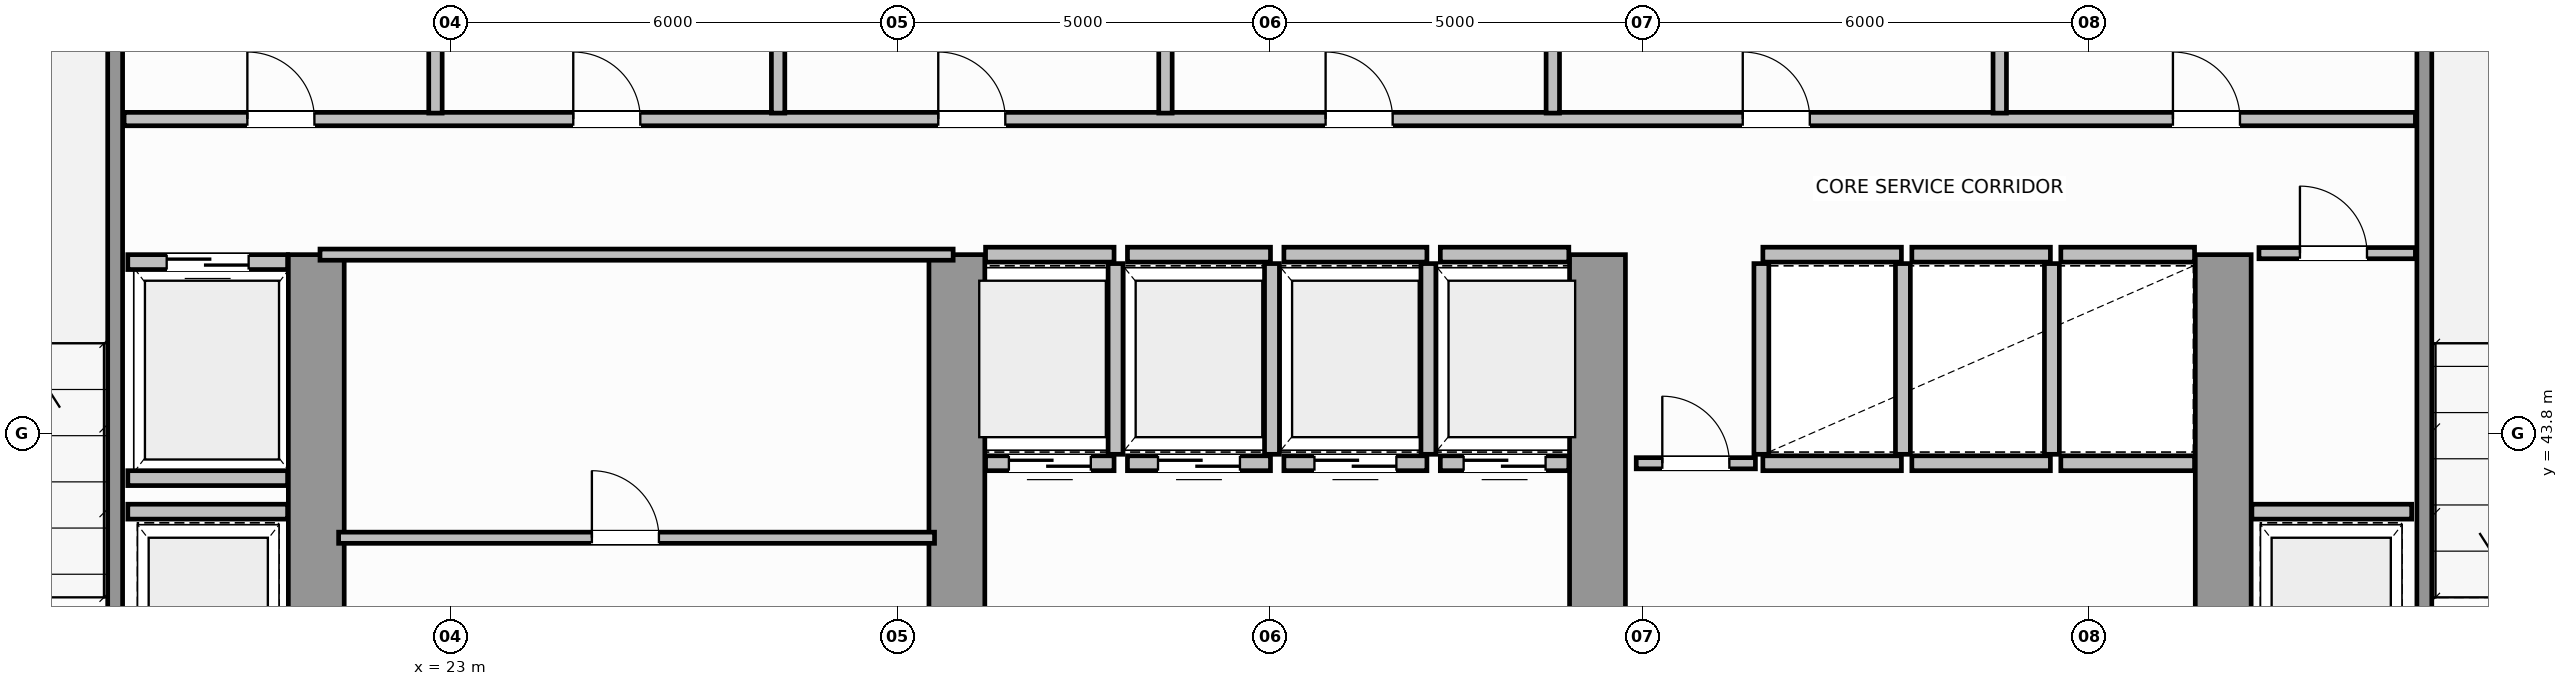
"""IFC4 building model, lengths in metres.
Left out: names, types, materials, properties, quantities, classifications, styles, units other than length and angle.
Written with IfcOpenShell. Run it as: python <this file> out.ifc"""

import sys

from ifc_helpers import new_model, si_unit, direction, frame, frame_2d, origin, place, context, subcontext, project, spatial, rectangle, extrude, source, transform, mapped, element, fill, save


model = new_model("IFC4")
c1 = context("Model", 3, precision=1e-05, world=origin(), true_north=direction((0.0, 1.0)))
c2 = subcontext(c1, "Body", "Model", "MODEL_VIEW")
j1 = project(units=[si_unit("LENGTHUNIT", "METRE"), si_unit("PLANEANGLEUNIT", "RADIAN")], contexts=[c1])
p1 = place(None, origin())
s1 = spatial("IfcSite", under=j1, at=p1, CompositionType="ELEMENT")
p2 = place(p1, origin())
s2 = spatial("IfcBuilding", under=s1, at=p2, CompositionType="ELEMENT")
p3 = place(p2, frame((0.0, 0.0, 111.0)))
s3 = spatial("IfcBuildingStorey", under=s2, at=p3, CompositionType="ELEMENT", Elevation=111.0)
for number, where, z_axis, x_axis in (
    (1, (21.2, 36.895, 0.0), (0.0, 0.0, 1.0), (0.0, 1.0, 0.0)),
    (2, (29.8, 36.895, 0.0), (0.0, 0.0, 1.0), (0.0, 1.0, 0.0)),
    (3, (38.4, 36.895, 0.0), (0.0, 0.0, 1.0), (0.0, 1.0, 0.0)),
    (4, (46.8, 36.895, 0.0), (0.0, 0.0, 1.0), (0.0, 1.0, 0.0)),
):
    element("IfcWall", number, at=place(p3, frame(where, z_axis=z_axis, x_axis=x_axis)), inside=s3, PredefinedType="SHEAR", context=c2, shape_type="SweptSolid", body=[
        extrude(rectangle(XDim=9.305, YDim=0.75, at=frame_2d((4.652, 0.0))), origin(), (0.0, 0.0, 1.0), 3.8),
    ])
for number, where, z_axis, x_axis in (
    (5, (18.5, 39.96, 0.0), (0.0, 0.0, 1.0), (0.0, 1.0, 0.0)),
    (6, (49.5, 39.96, 0.0), (0.0, 0.0, 1.0), (0.0, 1.0, 0.0)),
):
    element("IfcWall", number, at=place(p3, frame(where, z_axis=z_axis, x_axis=x_axis)), inside=s3, PredefinedType="SOLIDWALL", context=c2, shape_type="SweptSolid", body=[
        extrude(rectangle(XDim=9.93, YDim=0.2, at=frame_2d((4.965, 0.0))), origin(), (0.0, 0.0, 1.0), 3.8),
    ])
p4 = place(p3, frame((30.185, 43.4, 0.0), z_axis=(0.0, 0.0, 1.0), x_axis=(1.0, 0.0, 0.0)))
e7 = element("IfcWall", 7, at=p4, inside=s3, PredefinedType="SOLIDWALL", context=c2, shape_type="SweptSolid", body=[
    extrude(rectangle(XDim=1.725, YDim=0.2, at=frame_2d((0.862, 0.0))), origin(), (0.0, 0.0, 1.0), 3.58),
])
p5 = place(p4, frame((0.313, 0.0, 0.0)))
e8 = element("IfcOpeningElement", 8, at=p5, cuts=e7, PredefinedType="OPENING", context=c2, shape_type="SweptSolid", body=[
    extrude(rectangle(XDim=1.1, YDim=2.15, at=frame_2d((0.55, 1.075))), frame((0.0, 0.11, 0.0), z_axis=(0.0, -1.0, 0.0), x_axis=(1.0, 0.0, 0.0)), (0.0, 0.0, 1.0), 0.22),
])
p6 = place(p3, frame((30.185, 46.2, 0.0), z_axis=(0.0, 0.0, 1.0), x_axis=(1.0, 0.0, 0.0)))
e9 = element("IfcWall", 9, at=p6, inside=s3, PredefinedType="SOLIDWALL", context=c2, shape_type="SweptSolid", body=[
    extrude(rectangle(XDim=1.725, YDim=0.2, at=frame_2d((0.862, 0.0))), origin(), (0.0, 0.0, 1.0), 3.58),
])
p7 = place(p3, frame((31.93, 43.52, 0.0), z_axis=(0.0, 0.0, 1.0), x_axis=(0.0, 1.0, 0.0)))
e10 = element("IfcWall", 10, at=p7, inside=s3, PredefinedType="SOLIDWALL", context=c2, shape_type="SweptSolid", body=[
    extrude(rectangle(XDim=2.56, YDim=0.2, at=frame_2d((1.28, 0.0))), origin(), (0.0, 0.0, 1.0), 3.58),
])
p8 = place(p3, frame((32.09, 43.4, 0.0), z_axis=(0.0, 0.0, 1.0), x_axis=(1.0, 0.0, 0.0)))
e11 = element("IfcWall", 11, at=p8, inside=s3, PredefinedType="SOLIDWALL", context=c2, shape_type="SweptSolid", body=[
    extrude(rectangle(XDim=1.92, YDim=0.2, at=frame_2d((0.96, 0.0))), origin(), (0.0, 0.0, 1.0), 3.58),
])
p9 = place(p8, frame((0.41, 0.0, 0.0)))
e12 = element("IfcOpeningElement", 12, at=p9, cuts=e11, PredefinedType="OPENING", context=c2, shape_type="SweptSolid", body=[
    extrude(rectangle(XDim=1.1, YDim=2.15, at=frame_2d((0.55, 1.075))), frame((0.0, 0.11, 0.0), z_axis=(0.0, -1.0, 0.0), x_axis=(1.0, 0.0, 0.0)), (0.0, 0.0, 1.0), 0.22),
])
p10 = place(p3, frame((32.09, 46.2, 0.0), z_axis=(0.0, 0.0, 1.0), x_axis=(1.0, 0.0, 0.0)))
e13 = element("IfcWall", 13, at=p10, inside=s3, PredefinedType="SOLIDWALL", context=c2, shape_type="SweptSolid", body=[
    extrude(rectangle(XDim=1.92, YDim=0.2, at=frame_2d((0.96, 0.0))), origin(), (0.0, 0.0, 1.0), 3.58),
])
p11 = place(p3, frame((34.03, 43.52, 0.0), z_axis=(0.0, 0.0, 1.0), x_axis=(0.0, 1.0, 0.0)))
e14 = element("IfcWall", 14, at=p11, inside=s3, PredefinedType="SOLIDWALL", context=c2, shape_type="SweptSolid", body=[
    extrude(rectangle(XDim=2.56, YDim=0.2, at=frame_2d((1.28, 0.0))), origin(), (0.0, 0.0, 1.0), 3.58),
])
p12 = place(p3, frame((34.19, 43.4, 0.0), z_axis=(0.0, 0.0, 1.0), x_axis=(1.0, 0.0, 0.0)))
e15 = element("IfcWall", 15, at=p12, inside=s3, PredefinedType="SOLIDWALL", context=c2, shape_type="SweptSolid", body=[
    extrude(rectangle(XDim=1.92, YDim=0.2, at=frame_2d((0.96, 0.0))), origin(), (0.0, 0.0, 1.0), 3.58),
])
p13 = place(p12, frame((0.41, 0.0, 0.0)))
e16 = element("IfcOpeningElement", 16, at=p13, cuts=e15, PredefinedType="OPENING", context=c2, shape_type="SweptSolid", body=[
    extrude(rectangle(XDim=1.1, YDim=2.15, at=frame_2d((0.55, 1.075))), frame((0.0, 0.11, 0.0), z_axis=(0.0, -1.0, 0.0), x_axis=(1.0, 0.0, 0.0)), (0.0, 0.0, 1.0), 0.22),
])
p14 = place(p3, frame((34.19, 46.2, 0.0), z_axis=(0.0, 0.0, 1.0), x_axis=(1.0, 0.0, 0.0)))
e17 = element("IfcWall", 17, at=p14, inside=s3, PredefinedType="SOLIDWALL", context=c2, shape_type="SweptSolid", body=[
    extrude(rectangle(XDim=1.92, YDim=0.2, at=frame_2d((0.96, 0.0))), origin(), (0.0, 0.0, 1.0), 3.58),
])
p15 = place(p3, frame((36.13, 43.52, 0.0), z_axis=(0.0, 0.0, 1.0), x_axis=(0.0, 1.0, 0.0)))
e18 = element("IfcWall", 18, at=p15, inside=s3, PredefinedType="SOLIDWALL", context=c2, shape_type="SweptSolid", body=[
    extrude(rectangle(XDim=2.56, YDim=0.2, at=frame_2d((1.28, 0.0))), origin(), (0.0, 0.0, 1.0), 3.58),
])
p16 = place(p3, frame((36.29, 43.4, 0.0), z_axis=(0.0, 0.0, 1.0), x_axis=(1.0, 0.0, 0.0)))
e19 = element("IfcWall", 19, at=p16, inside=s3, PredefinedType="SOLIDWALL", context=c2, shape_type="SweptSolid", body=[
    extrude(rectangle(XDim=1.725, YDim=0.2, at=frame_2d((0.862, 0.0))), origin(), (0.0, 0.0, 1.0), 3.58),
])
p17 = place(p16, frame((0.313, 0.0, 0.0)))
e20 = element("IfcOpeningElement", 20, at=p17, cuts=e19, PredefinedType="OPENING", context=c2, shape_type="SweptSolid", body=[
    extrude(rectangle(XDim=1.1, YDim=2.15, at=frame_2d((0.55, 1.075))), frame((0.0, 0.11, 0.0), z_axis=(0.0, -1.0, 0.0), x_axis=(1.0, 0.0, 0.0)), (0.0, 0.0, 1.0), 0.22),
])
p18 = place(p3, frame((36.29, 46.2, 0.0), z_axis=(0.0, 0.0, 1.0), x_axis=(1.0, 0.0, 0.0)))
e21 = element("IfcWall", 21, at=p18, inside=s3, PredefinedType="SOLIDWALL", context=c2, shape_type="SweptSolid", body=[
    extrude(rectangle(XDim=1.725, YDim=0.2, at=frame_2d((0.862, 0.0))), origin(), (0.0, 0.0, 1.0), 3.58),
])
for number, where, z_axis, x_axis in (
    (22, (40.62, 43.4, 0.0), (0.0, 0.0, 1.0), (1.0, 0.0, 0.0)),
    (23, (40.62, 46.2, 0.0), (0.0, 0.0, 1.0), (1.0, 0.0, 0.0)),
):
    element("IfcWall", number, at=place(p3, frame(where, z_axis=z_axis, x_axis=x_axis)), inside=s3, PredefinedType="SOLIDWALL", context=c2, shape_type="SweptSolid", body=[
        extrude(rectangle(XDim=1.86, YDim=0.2, at=frame_2d((0.93, 0.0))), origin(), (0.0, 0.0, 1.0), 3.58),
    ])
for number, where, z_axis, x_axis in (
    (24, (40.6, 43.52, 0.0), (0.0, 0.0, 1.0), (0.0, 1.0, 0.0)),
    (25, (42.5, 43.52, 0.0), (0.0, 0.0, 1.0), (0.0, 1.0, 0.0)),
):
    element("IfcWall", number, at=place(p3, frame(where, z_axis=z_axis, x_axis=x_axis)), inside=s3, PredefinedType="SOLIDWALL", context=c2, shape_type="SweptSolid", body=[
        extrude(rectangle(XDim=2.56, YDim=0.2, at=frame_2d((1.28, 0.0))), origin(), (0.0, 0.0, 1.0), 3.58),
    ])
for number, where, z_axis, x_axis in (
    (26, (42.62, 43.4, 0.0), (0.0, 0.0, 1.0), (1.0, 0.0, 0.0)),
    (27, (42.62, 46.2, 0.0), (0.0, 0.0, 1.0), (1.0, 0.0, 0.0)),
):
    element("IfcWall", number, at=place(p3, frame(where, z_axis=z_axis, x_axis=x_axis)), inside=s3, PredefinedType="SOLIDWALL", context=c2, shape_type="SweptSolid", body=[
        extrude(rectangle(XDim=1.86, YDim=0.2, at=frame_2d((0.93, 0.0))), origin(), (0.0, 0.0, 1.0), 3.58),
    ])
p19 = place(p3, frame((44.5, 43.52, 0.0), z_axis=(0.0, 0.0, 1.0), x_axis=(0.0, 1.0, 0.0)))
e28 = element("IfcWall", 28, at=p19, inside=s3, PredefinedType="SOLIDWALL", context=c2, shape_type="SweptSolid", body=[
    extrude(rectangle(XDim=2.56, YDim=0.2, at=frame_2d((1.28, 0.0))), origin(), (0.0, 0.0, 1.0), 3.58),
])
for number, where, z_axis, x_axis in (
    (29, (44.62, 43.4, 0.0), (0.0, 0.0, 1.0), (1.0, 0.0, 0.0)),
    (30, (44.62, 46.2, 0.0), (0.0, 0.0, 1.0), (1.0, 0.0, 0.0)),
):
    element("IfcWall", number, at=place(p3, frame(where, z_axis=z_axis, x_axis=x_axis)), inside=s3, PredefinedType="SOLIDWALL", context=c2, shape_type="SweptSolid", body=[
        extrude(rectangle(XDim=1.795, YDim=0.2, at=frame_2d((0.897, 0.0))), origin(), (0.0, 0.0, 1.0), 3.58),
    ])
p20 = place(p3, frame((18.67, 46.1, 0.0), z_axis=(0.0, 0.0, 1.0), x_axis=(1.0, 0.0, 0.0)))
e31 = element("IfcWall", 31, at=p20, inside=s3, PredefinedType="SOLIDWALL", context=c2, shape_type="SweptSolid", body=[
    extrude(rectangle(XDim=2.145, YDim=0.2, at=frame_2d((1.073, 0.0))), origin(), (0.0, 0.0, 1.0), 3.58),
])
p21 = place(p20, frame((0.522, 0.0, 0.0)))
e32 = element("IfcOpeningElement", 32, at=p21, cuts=e31, PredefinedType="OPENING", context=c2, shape_type="SweptSolid", body=[
    extrude(rectangle(XDim=1.1, YDim=2.15, at=frame_2d((0.55, 1.075))), frame((0.0, 0.11, 0.0), z_axis=(0.0, -1.0, 0.0), x_axis=(1.0, 0.0, 0.0)), (0.0, 0.0, 1.0), 0.22),
])
for number, where, z_axis, x_axis in (
    (33, (18.67, 43.2, 0.0), (0.0, 0.0, 1.0), (1.0, 0.0, 0.0)),
    (34, (18.67, 42.75, 0.0), (0.0, 0.0, 1.0), (1.0, 0.0, 0.0)),
    (35, (47.185, 42.75, 0.0), (0.0, 0.0, 1.0), (1.0, 0.0, 0.0)),
):
    element("IfcWall", number, at=place(p3, frame(where, z_axis=z_axis, x_axis=x_axis)), inside=s3, PredefinedType="SOLIDWALL", context=c2, shape_type="SweptSolid", body=[
        extrude(rectangle(XDim=2.145, YDim=0.2, at=frame_2d((1.073, 0.0))), origin(), (0.0, 0.0, 1.0), 3.58),
    ])
p22 = place(p3, frame((21.25, 46.2, 0.0), z_axis=(0.0, 0.0, 1.0), x_axis=(1.0, 0.0, 0.0)))
e36 = element("IfcWall", 36, at=p22, inside=s3, PredefinedType="PARTITIONING", context=c2, shape_type="SweptSolid", body=[
    extrude(rectangle(XDim=8.5, YDim=0.15, at=frame_2d((4.25, 0.0))), origin(), (0.0, 0.0, 1.0), 3.58),
])
p23 = place(p3, frame((21.5, 42.4, 0.0), z_axis=(0.0, 0.0, 1.0), x_axis=(1.0, 0.0, 0.0)))
e37 = element("IfcWall", 37, at=p23, inside=s3, PredefinedType="PARTITIONING", context=c2, shape_type="SweptSolid", body=[
    extrude(rectangle(XDim=8.0, YDim=0.15, at=frame_2d((4.0, 0.0))), origin(), (0.0, 0.0, 1.0), 3.58),
])
p24 = place(p23, frame((3.4, 0.0, 0.0)))
e38 = element("IfcOpeningElement", 38, at=p24, cuts=e37, PredefinedType="OPENING", context=c2, shape_type="SweptSolid", body=[
    extrude(rectangle(XDim=0.9, YDim=2.1, at=frame_2d((0.45, 1.05))), frame((0.0, 0.085, 0.0), z_axis=(0.0, -1.0, 0.0), x_axis=(1.0, 0.0, 0.0)), (0.0, 0.0, 1.0), 0.17),
])
p25 = place(p3, frame((47.28, 46.22, 0.0), z_axis=(0.0, 0.0, 1.0), x_axis=(1.0, 0.0, 0.0)))
e39 = element("IfcWall", 39, at=p25, inside=s3, PredefinedType="PARTITIONING", context=c2, shape_type="SweptSolid", body=[
    extrude(rectangle(XDim=2.1, YDim=0.15, at=frame_2d((1.05, 0.0))), origin(), (0.0, 0.0, 1.0), 3.58),
])
p26 = place(p25, frame((0.55, 0.0, 0.0)))
e40 = element("IfcOpeningElement", 40, at=p26, cuts=e39, PredefinedType="OPENING", context=c2, shape_type="SweptSolid", body=[
    extrude(rectangle(XDim=0.9, YDim=2.1, at=frame_2d((0.45, 1.05))), frame((0.0, 0.085, 0.0), z_axis=(0.0, -1.0, 0.0), x_axis=(1.0, 0.0, 0.0)), (0.0, 0.0, 1.0), 0.17),
])
p27 = place(p3, frame((38.92, 43.4, 0.0), z_axis=(0.0, 0.0, 1.0), x_axis=(1.0, 0.0, 0.0)))
e41 = element("IfcWall", 41, at=p27, inside=s3, PredefinedType="PARTITIONING", context=c2, shape_type="SweptSolid", body=[
    extrude(rectangle(XDim=1.6, YDim=0.15, at=frame_2d((0.8, 0.0))), origin(), (0.0, 0.0, 1.0), 3.58),
])
p28 = place(p27, frame((0.35, 0.0, 0.0)))
e42 = element("IfcOpeningElement", 42, at=p28, cuts=e41, PredefinedType="OPENING", context=c2, shape_type="SweptSolid", body=[
    extrude(rectangle(XDim=0.9, YDim=2.1, at=frame_2d((0.45, 1.05))), frame((0.0, 0.085, 0.0), z_axis=(0.0, -1.0, 0.0), x_axis=(1.0, 0.0, 0.0)), (0.0, 0.0, 1.0), 0.17),
])
p29 = place(p3, frame((18.62, 48.02, 0.0), z_axis=(0.0, 0.0, 1.0), x_axis=(1.0, 0.0, 0.0)))
e43 = element("IfcWall", 43, at=p29, inside=s3, PredefinedType="PLUMBINGWALL", context=c2, shape_type="SweptSolid", body=[
    extrude(rectangle(XDim=30.76, YDim=0.18, at=frame_2d((15.38, 0.0))), origin(), (0.0, 0.0, 1.0), 3.58),
])
p30 = place(p29, frame((1.655, 0.0, 0.0)))
e44 = element("IfcOpeningElement", 44, at=p30, cuts=e43, PredefinedType="OPENING", context=c2, shape_type="SweptSolid", body=[
    extrude(rectangle(XDim=0.9, YDim=2.15, at=frame_2d((0.45, 1.075))), frame((0.0, 0.1, 0.0), z_axis=(0.0, -1.0, 0.0), x_axis=(1.0, 0.0, 0.0)), (0.0, 0.0, 1.0), 0.2),
])
p31 = place(p29, frame((6.03, 0.0, 0.0)))
e45 = element("IfcOpeningElement", 45, at=p31, cuts=e43, PredefinedType="OPENING", context=c2, shape_type="SweptSolid", body=[
    extrude(rectangle(XDim=0.9, YDim=2.15, at=frame_2d((0.45, 1.075))), frame((0.0, 0.1, 0.0), z_axis=(0.0, -1.0, 0.0), x_axis=(1.0, 0.0, 0.0)), (0.0, 0.0, 1.0), 0.2),
])
p32 = place(p29, frame((10.93, 0.0, 0.0)))
e46 = element("IfcOpeningElement", 46, at=p32, cuts=e43, PredefinedType="OPENING", context=c2, shape_type="SweptSolid", body=[
    extrude(rectangle(XDim=0.9, YDim=2.15, at=frame_2d((0.45, 1.075))), frame((0.0, 0.1, 0.0), z_axis=(0.0, -1.0, 0.0), x_axis=(1.0, 0.0, 0.0)), (0.0, 0.0, 1.0), 0.2),
])
p33 = place(p29, frame((16.13, 0.0, 0.0)))
e47 = element("IfcOpeningElement", 47, at=p33, cuts=e43, PredefinedType="OPENING", context=c2, shape_type="SweptSolid", body=[
    extrude(rectangle(XDim=0.9, YDim=2.15, at=frame_2d((0.45, 1.075))), frame((0.0, 0.1, 0.0), z_axis=(0.0, -1.0, 0.0), x_axis=(1.0, 0.0, 0.0)), (0.0, 0.0, 1.0), 0.2),
])
p34 = place(p29, frame((21.73, 0.0, 0.0)))
e48 = element("IfcOpeningElement", 48, at=p34, cuts=e43, PredefinedType="OPENING", context=c2, shape_type="SweptSolid", body=[
    extrude(rectangle(XDim=0.9, YDim=2.15, at=frame_2d((0.45, 1.075))), frame((0.0, 0.1, 0.0), z_axis=(0.0, -1.0, 0.0), x_axis=(1.0, 0.0, 0.0)), (0.0, 0.0, 1.0), 0.2),
])
p35 = place(p29, frame((27.505, 0.0, 0.0)))
e49 = element("IfcOpeningElement", 49, at=p35, cuts=e43, PredefinedType="OPENING", context=c2, shape_type="SweptSolid", body=[
    extrude(rectangle(XDim=0.9, YDim=2.15, at=frame_2d((0.45, 1.075))), frame((0.0, 0.1, 0.0), z_axis=(0.0, -1.0, 0.0), x_axis=(1.0, 0.0, 0.0)), (0.0, 0.0, 1.0), 0.2),
])
p36 = place(p3, frame((22.8, 48.1, 0.0), z_axis=(0.0, 0.0, 1.0), x_axis=(0.0, 1.0, 0.0)))
e50 = element("IfcWall", 50, at=p36, inside=s3, PredefinedType="PLUMBINGWALL", context=c2, shape_type="SweptSolid", body=[
    extrude(rectangle(XDim=2.13, YDim=0.18, at=frame_2d((1.065, 0.0))), origin(), (0.0, 0.0, 1.0), 2.87),
])
for number, where, z_axis, x_axis in (
    (51, (27.4, 48.1, 0.0), (0.0, 0.0, 1.0), (0.0, 1.0, 0.0)),
    (52, (32.6, 48.1, 0.0), (0.0, 0.0, 1.0), (0.0, 1.0, 0.0)),
    (53, (37.8, 48.1, 0.0), (0.0, 0.0, 1.0), (0.0, 1.0, 0.0)),
    (54, (43.8, 48.1, 0.0), (0.0, 0.0, 1.0), (0.0, 1.0, 0.0)),
):
    element("IfcWall", number, at=place(p3, frame(where, z_axis=z_axis, x_axis=x_axis)), inside=s3, PredefinedType="PLUMBINGWALL", context=c2, shape_type="SweptSolid", body=[
        extrude(rectangle(XDim=2.13, YDim=0.18, at=frame_2d((1.065, 0.0))), origin(), (0.0, 0.0, 1.0), 3.58),
    ])
m1 = source(origin(), c2, "Body", "SweptSolid", [
    extrude(rectangle(XDim=1.1, YDim=2.15, at=frame_2d((0.55, 1.075))), frame((0.0, 0.025, 0.0), z_axis=(0.0, -1.0, 0.0), x_axis=(1.0, 0.0, 0.0)), (0.0, 0.0, 1.0), 0.05),
])
p37 = place(p5, origin())
e55 = element("IfcDoor", 55, at=p37, inside=s3, OperationType="DOUBLE_DOOR_SLIDING", PredefinedType="DOOR", context=c2, shape_type="MappedRepresentation", body=[
    mapped(m1, transform((0.0, 0.0, 0.0), scale=1.0)),
])
fill(e8, e55)
p38 = place(p9, origin())
e56 = element("IfcDoor", 56, at=p38, inside=s3, OperationType="DOUBLE_DOOR_SLIDING", PredefinedType="DOOR", context=c2, shape_type="MappedRepresentation", body=[
    mapped(m1, transform((0.0, 0.0, 0.0), scale=1.0)),
])
fill(e12, e56)
p39 = place(p13, origin())
e57 = element("IfcDoor", 57, at=p39, inside=s3, OperationType="DOUBLE_DOOR_SLIDING", PredefinedType="DOOR", context=c2, shape_type="MappedRepresentation", body=[
    mapped(m1, transform((0.0, 0.0, 0.0), scale=1.0)),
])
fill(e16, e57)
p40 = place(p17, origin())
e58 = element("IfcDoor", 58, at=p40, inside=s3, OperationType="DOUBLE_DOOR_SLIDING", PredefinedType="DOOR", context=c2, shape_type="MappedRepresentation", body=[
    mapped(m1, transform((0.0, 0.0, 0.0), scale=1.0)),
])
fill(e20, e58)
p41 = place(p21, origin())
e59 = element("IfcDoor", 59, at=p41, inside=s3, OperationType="DOUBLE_DOOR_SLIDING", PredefinedType="DOOR", context=c2, shape_type="MappedRepresentation", body=[
    mapped(m1, transform((0.0, 0.0, 0.0), scale=1.0)),
])
fill(e32, e59)
m2 = source(origin(), c2, "Body", "SweptSolid", [
    extrude(rectangle(XDim=0.9, YDim=2.1, at=frame_2d((0.45, 1.05))), frame((0.0, 0.025, 0.0), z_axis=(0.0, -1.0, 0.0), x_axis=(1.0, 0.0, 0.0)), (0.0, 0.0, 1.0), 0.05),
])
p42 = place(p24, origin())
e60 = element("IfcDoor", 60, at=p42, inside=s3, OperationType="SINGLE_SWING_RIGHT", PredefinedType="DOOR", context=c2, shape_type="MappedRepresentation", body=[
    mapped(m2, transform((0.0, 0.0, 0.0), scale=1.0)),
])
fill(e38, e60)
p43 = place(p26, origin())
e61 = element("IfcDoor", 61, at=p43, inside=s3, OperationType="SINGLE_SWING_RIGHT", PredefinedType="DOOR", context=c2, shape_type="MappedRepresentation", body=[
    mapped(m2, transform((0.0, 0.0, 0.0), scale=1.0)),
])
fill(e40, e61)
p44 = place(p28, origin())
e62 = element("IfcDoor", 62, at=p44, inside=s3, OperationType="SINGLE_SWING_LEFT", PredefinedType="DOOR", context=c2, shape_type="MappedRepresentation", body=[
    mapped(m2, transform((0.0, 0.0, 0.0), scale=1.0)),
])
fill(e42, e62)
m3 = source(origin(), c2, "Body", "SweptSolid", [
    extrude(rectangle(XDim=0.9, YDim=2.15, at=frame_2d((0.45, 1.075))), frame((0.0, 0.025, 0.0), z_axis=(0.0, -1.0, 0.0), x_axis=(1.0, 0.0, 0.0)), (0.0, 0.0, 1.0), 0.05),
])
p45 = place(p30, origin())
e63 = element("IfcDoor", 63, at=p45, inside=s3, OperationType="SINGLE_SWING_LEFT", PredefinedType="DOOR", context=c2, shape_type="MappedRepresentation", body=[
    mapped(m3, transform((0.0, 0.0, 0.0), scale=1.0)),
])
fill(e44, e63)
p46 = place(p31, origin())
e64 = element("IfcDoor", 64, at=p46, inside=s3, OperationType="SINGLE_SWING_RIGHT", PredefinedType="DOOR", context=c2, shape_type="MappedRepresentation", body=[
    mapped(m3, transform((0.0, 0.0, 0.0), scale=1.0)),
])
fill(e45, e64)
p47 = place(p32, origin())
e65 = element("IfcDoor", 65, at=p47, inside=s3, OperationType="SINGLE_SWING_LEFT", PredefinedType="DOOR", context=c2, shape_type="MappedRepresentation", body=[
    mapped(m3, transform((0.0, 0.0, 0.0), scale=1.0)),
])
fill(e46, e65)
p48 = place(p33, origin())
e66 = element("IfcDoor", 66, at=p48, inside=s3, OperationType="SINGLE_SWING_RIGHT", PredefinedType="DOOR", context=c2, shape_type="MappedRepresentation", body=[
    mapped(m3, transform((0.0, 0.0, 0.0), scale=1.0)),
])
fill(e47, e66)
p49 = place(p34, origin())
e67 = element("IfcDoor", 67, at=p49, inside=s3, OperationType="SINGLE_SWING_LEFT", PredefinedType="DOOR", context=c2, shape_type="MappedRepresentation", body=[
    mapped(m3, transform((0.0, 0.0, 0.0), scale=1.0)),
])
fill(e48, e67)
p50 = place(p35, origin())
e68 = element("IfcDoor", 68, at=p50, inside=s3, OperationType="SINGLE_SWING_RIGHT", PredefinedType="DOOR", context=c2, shape_type="MappedRepresentation", body=[
    mapped(m3, transform((0.0, 0.0, 0.0), scale=1.0)),
])
fill(e49, e68)
save(model, sys.argv[1])
